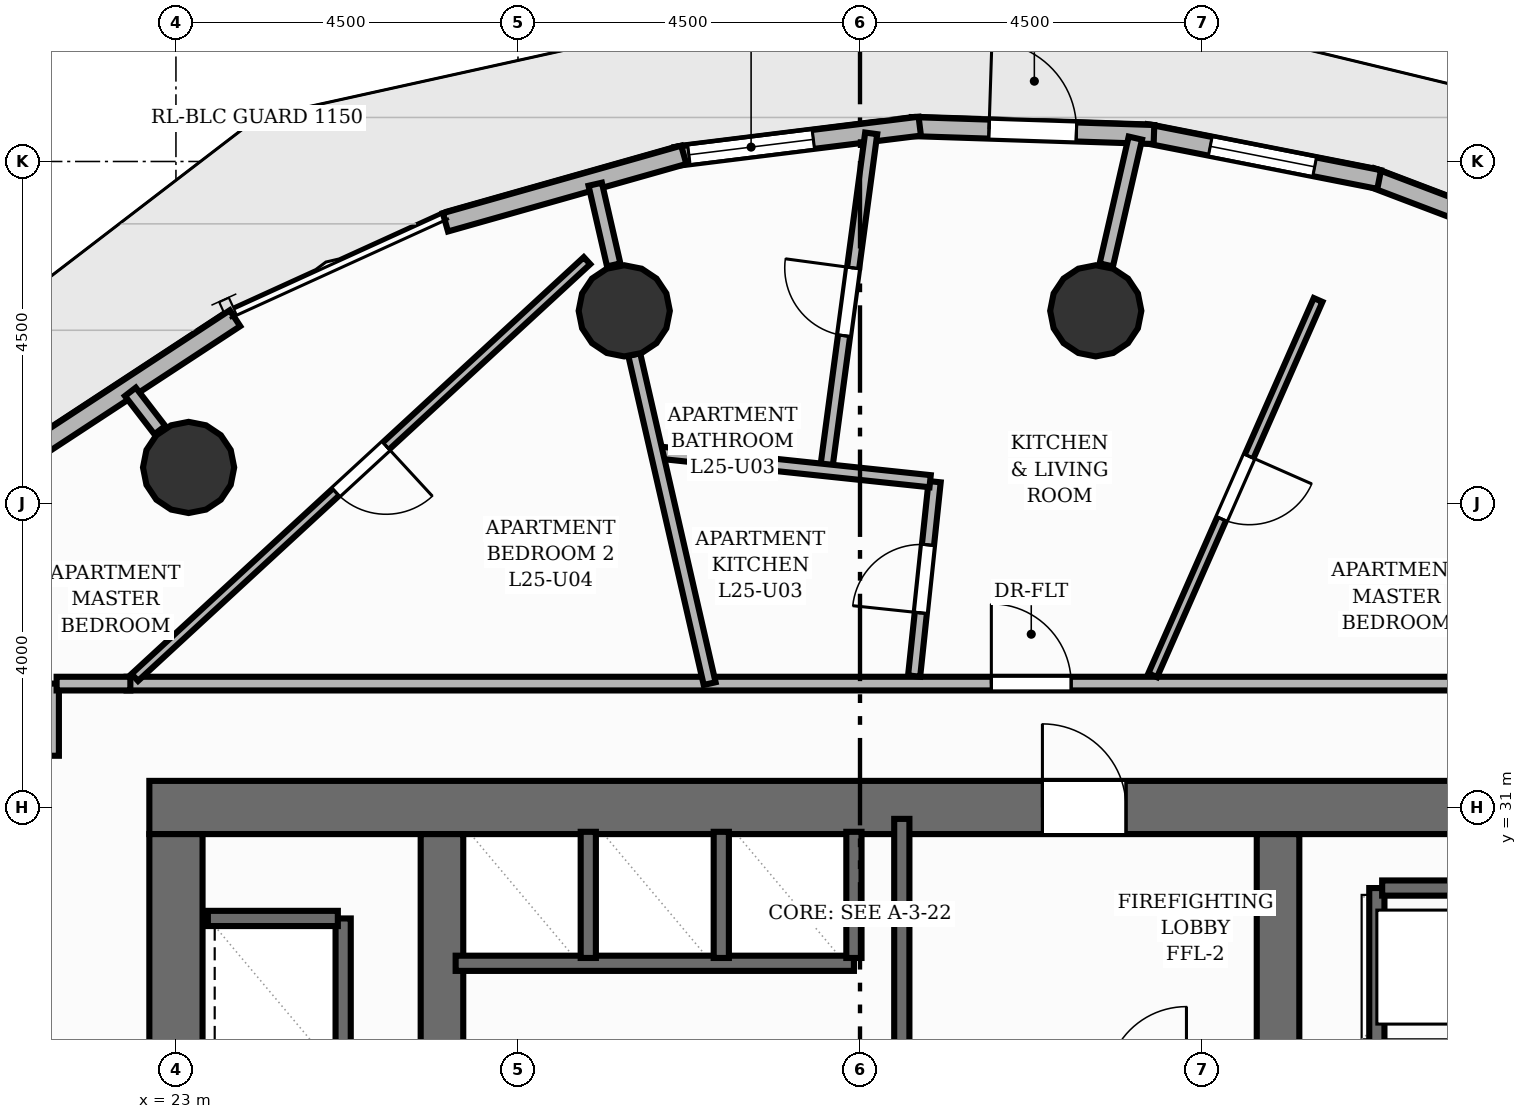
"""IFC4 building model, lengths in metres.
Left out: names, types, materials, properties, quantities, classifications, styles, units other than length and angle.
Written with IfcOpenShell. Run it as: python <this file> out.ifc"""

import sys

from ifc_helpers import new_model, si_unit, direction, frame, frame_2d, origin, origin_2d, place, context, subcontext, project, spatial, rectangle, circle, extrude, element, fill, save


model = new_model("IFC4")
c1 = context("Model", 3, precision=1e-05, world=origin(), true_north=direction((0.0, 1.0)))
c2 = subcontext(c1, "Body", "Model", "MODEL_VIEW")
j1 = project(units=[si_unit("LENGTHUNIT", "METRE"), si_unit("PLANEANGLEUNIT", "RADIAN")], contexts=[c1])
p1 = place(None, origin())
s1 = spatial("IfcSite", under=j1, at=p1, CompositionType="ELEMENT")
p2 = place(p1, origin())
s2 = spatial("IfcBuilding", under=s1, at=p2, CompositionType="ELEMENT")
p3 = place(p2, frame((0.0, 0.0, 86.88)))
s3 = spatial("IfcBuildingStorey", under=s2, at=p3, CompositionType="ELEMENT", Elevation=86.88)
p4 = place(p3, frame((22.65, 31.0, 0.0), z_axis=(0.0, 0.0, 1.0), x_axis=(1.0, 0.0, 0.0)))
e1 = element("IfcWall", 1, at=p4, inside=s3, PredefinedType="SHEAR", context=c2, shape_type="SweptSolid", body=[
    extrude(rectangle(XDim=18.7, YDim=0.7, at=frame_2d((9.35, 0.0))), origin(), (0.0, 0.0, 1.0), 3.2),
])
p5 = place(p4, frame((11.75, 0.0, 0.0)))
e2 = element("IfcOpeningElement", 2, at=p5, cuts=e1, PredefinedType="OPENING", context=c2, shape_type="SweptSolid", body=[
    extrude(rectangle(XDim=1.1, YDim=2.15, at=frame_2d((0.55, 1.075))), frame((0.0, 0.36, 0.0), z_axis=(0.0, -1.0, 0.0), x_axis=(1.0, 0.0, 0.0)), (0.0, 0.0, 1.0), 0.72),
])
p6 = place(p3, frame((23.0, 17.35, 0.0), z_axis=(0.0, 0.0, 1.0), x_axis=(0.0, 1.0, 0.0)))
e3 = element("IfcWall", 3, at=p6, inside=s3, PredefinedType="SHEAR", context=c2, shape_type="SweptSolid", body=[
    extrude(rectangle(XDim=13.3, YDim=0.7, at=frame_2d((6.65, 0.0))), origin(), (0.0, 0.0, 1.0), 3.2),
])
for number, where, z_axis, x_axis in (
    (4, (26.5, 17.35, 0.0), (0.0, 0.0, 1.0), (0.0, 1.0, 0.0)),
    (5, (37.5, 17.35, 0.0), (0.0, 0.0, 1.0), (0.0, 1.0, 0.0)),
):
    element("IfcWall", number, at=place(p3, frame(where, z_axis=z_axis, x_axis=x_axis)), inside=s3, PredefinedType="SHEAR", context=c2, shape_type="SweptSolid", body=[
        extrude(rectangle(XDim=13.3, YDim=0.56, at=frame_2d((6.65, 0.0))), origin(), (0.0, 0.0, 1.0), 3.2),
    ])
for number, where, z_axis, x_axis in (
    (6, (35.102, 37.535, 0.0), (0.0, 0.0, 1.0), (1.0, 0.0, 0.0)),
    (7, (28.898, 37.535, 0.0), (0.0, 0.0, 1.0), (1.0, 0.0, 0.0)),
    (8, (23.167, 35.474, 0.0), (0.0, 0.0, 1.0), (1.0, 0.0, 0.0)),
):
    element("IfcColumn", number, at=place(p3, frame(where, z_axis=z_axis, x_axis=x_axis)), inside=s3, PredefinedType="COLUMN", context=c2, shape_type="SweptSolid", body=[
        extrude(circle(Radius=0.6, at=origin_2d()), origin(), (0.0, 0.0, 1.0), 3.2),
    ])
p7 = place(p3, frame((38.724, 39.293, 0.0), z_axis=(0.0, 0.0, 1.0), x_axis=(0.934815891493, -0.355132720277, 0.0)))
e9 = element("IfcWall", 9, at=p7, inside=s3, PredefinedType="SOLIDWALL", context=c2, shape_type="SweptSolid", body=[
    extrude(rectangle(XDim=3.061, YDim=0.25, at=frame_2d((1.53, 0.0))), origin(), (0.0, 0.0, 1.0), 2.96),
])
p8 = place(p3, frame((35.758, 39.867, 0.0), z_axis=(0.0, 0.0, 1.0), x_axis=(0.981187677549, -0.193056316721, 0.0)))
e10 = element("IfcWall", 10, at=p8, inside=s3, PredefinedType="SOLIDWALL", context=c2, shape_type="SweptSolid", body=[
    extrude(rectangle(XDim=3.131, YDim=0.25, at=frame_2d((1.565, 0.0))), origin(), (0.0, 0.0, 1.0), 2.96),
])
p9 = place(p8, frame((0.866, 0.0, 0.85)))
e11 = element("IfcOpeningElement", 11, at=p9, cuts=e10, PredefinedType="OPENING", context=c2, shape_type="SweptSolid", body=[
    extrude(rectangle(XDim=1.4, YDim=1.55, at=frame_2d((0.7, 0.775))), frame((0.0, 0.135, 0.0), z_axis=(0.0, -1.0, 0.0), x_axis=(1.0, 0.0, 0.0)), (0.0, 0.0, 1.0), 0.27),
])
p10 = place(p3, frame((32.677, 39.959, 0.0), z_axis=(0.0, 0.0, 1.0), x_axis=(0.999464092211, -0.032734208101, 0.0)))
e12 = element("IfcWall", 12, at=p10, inside=s3, PredefinedType="SOLIDWALL", context=c2, shape_type="SweptSolid", body=[
    extrude(rectangle(XDim=3.192, YDim=0.25, at=frame_2d((1.596, 0.0))), origin(), (0.0, 0.0, 1.0), 2.96),
])
p11 = place(p10, frame((1.021, 0.0, 0.0)))
e13 = element("IfcOpeningElement", 13, at=p11, cuts=e12, PredefinedType="OPENING", context=c2, shape_type="SweptSolid", body=[
    extrude(rectangle(XDim=1.15, YDim=2.2, at=frame_2d((0.575, 1.1))), frame((0.0, 0.135, 0.0), z_axis=(0.0, -1.0, 0.0), x_axis=(1.0, 0.0, 0.0)), (0.0, 0.0, 1.0), 0.27),
])
p12 = place(p3, frame((29.575, 39.566, 0.0), z_axis=(0.0, 0.0, 1.0), x_axis=(0.99241077266, 0.122966899235, 0.0)))
e14 = element("IfcWall", 14, at=p12, inside=s3, PredefinedType="SOLIDWALL", context=c2, shape_type="SweptSolid", body=[
    extrude(rectangle(XDim=3.236, YDim=0.25, at=frame_2d((1.618, 0.0))), origin(), (0.0, 0.0, 1.0), 2.96),
])
p13 = place(p12, frame((0.175, 0.0, 0.85)))
e15 = element("IfcOpeningElement", 15, at=p13, cuts=e14, PredefinedType="OPENING", context=c2, shape_type="SweptSolid", body=[
    extrude(rectangle(XDim=1.65, YDim=1.55, at=frame_2d((0.825, 0.775))), frame((0.0, 0.135, 0.0), z_axis=(0.0, -1.0, 0.0), x_axis=(1.0, 0.0, 0.0)), (0.0, 0.0, 1.0), 0.27),
])
p14 = place(p3, frame((26.545, 38.699, 0.0), z_axis=(0.0, 0.0, 1.0), x_axis=(0.962134911526, 0.272573681825, 0.0)))
e16 = element("IfcWall", 16, at=p14, inside=s3, PredefinedType="SOLIDWALL", context=c2, shape_type="SweptSolid", body=[
    extrude(rectangle(XDim=3.26, YDim=0.25, at=frame_2d((1.63, 0.0))), origin(), (0.0, 0.0, 1.0), 2.96),
])
p15 = place(p3, frame((21.071, 35.663, 0.0), z_axis=(0.0, 0.0, 1.0), x_axis=(0.836273856728, 0.548311988336, 0.0)))
e17 = element("IfcWall", 17, at=p15, inside=s3, PredefinedType="SOLIDWALL", context=c2, shape_type="SweptSolid", body=[
    extrude(rectangle(XDim=3.236, YDim=0.25, at=frame_2d((1.618, 0.0))), origin(), (0.0, 0.0, 1.0), 2.96),
])
p16 = place(p3, frame((32.55, 27.35, 0.0), z_axis=(0.0, 0.0, 1.0), x_axis=(0.0, 1.0, 0.0)))
e18 = element("IfcWall", 18, at=p16, inside=s3, PredefinedType="SHEAR", context=c2, shape_type="SweptSolid", body=[
    extrude(rectangle(XDim=3.5, YDim=0.2, at=frame_2d((1.75, 0.0))), origin(), (0.0, 0.0, 1.0), 3.2),
])
p17 = place(p3, frame((38.8, 18.06, 0.0), z_axis=(0.0, 0.0, 1.0), x_axis=(0.0, 1.0, 0.0)))
e19 = element("IfcWall", 19, at=p17, inside=s3, PredefinedType="SHEAR", context=c2, shape_type="SweptSolid", body=[
    extrude(rectangle(XDim=11.88, YDim=0.2, at=frame_2d((5.94, 0.0))), origin(), (0.0, 0.0, 1.0), 3.2),
])
p18 = place(p3, frame((38.87, 29.94, 0.0), z_axis=(0.0, 0.0, 1.0), x_axis=(1.0, 0.0, 0.0)))
e20 = element("IfcWall", 20, at=p18, inside=s3, PredefinedType="SHEAR", context=c2, shape_type="SweptSolid", body=[
    extrude(rectangle(XDim=1.71, YDim=0.2, at=frame_2d((0.855, 0.0))), origin(), (0.0, 0.0, 1.0), 3.2),
])
p19 = place(p3, frame((25.2, 18.46, 0.0), z_axis=(0.0, 0.0, 1.0), x_axis=(0.0, 1.0, 0.0)))
e21 = element("IfcWall", 21, at=p19, inside=s3, PredefinedType="SHEAR", context=c2, shape_type="SweptSolid", body=[
    extrude(rectangle(XDim=11.08, YDim=0.2, at=frame_2d((5.54, 0.0))), origin(), (0.0, 0.0, 1.0), 3.2),
])
p20 = place(p3, frame((23.42, 29.54, 0.0), z_axis=(0.0, 0.0, 1.0), x_axis=(1.0, 0.0, 0.0)))
e22 = element("IfcWall", 22, at=p20, inside=s3, PredefinedType="SHEAR", context=c2, shape_type="SweptSolid", body=[
    extrude(rectangle(XDim=1.71, YDim=0.2, at=frame_2d((0.855, 0.0))), origin(), (0.0, 0.0, 1.0), 3.2),
])
p21 = place(p3, frame((26.68, 28.95, 0.0), z_axis=(0.0, 0.0, 1.0), x_axis=(1.0, 0.0, 0.0)))
e23 = element("IfcWall", 23, at=p21, inside=s3, PredefinedType="SHEAR", context=c2, shape_type="SweptSolid", body=[
    extrude(rectangle(XDim=5.24, YDim=0.2, at=frame_2d((2.62, 0.0))), origin(), (0.0, 0.0, 1.0), 3.2),
])
for number, where, z_axis, x_axis in (
    (24, (31.92, 29.02, 0.0), (0.0, 0.0, 1.0), (0.0, 1.0, 0.0)),
    (25, (28.425, 29.02, 0.0), (0.0, 0.0, 1.0), (0.0, 1.0, 0.0)),
    (26, (30.175, 29.02, 0.0), (0.0, 0.0, 1.0), (0.0, 1.0, 0.0)),
):
    element("IfcWall", number, at=place(p3, frame(where, z_axis=z_axis, x_axis=x_axis)), inside=s3, PredefinedType="SHEAR", context=c2, shape_type="SweptSolid", body=[
        extrude(rectangle(XDim=1.66, YDim=0.2, at=frame_2d((0.83, 0.0))), origin(), (0.0, 0.0, 1.0), 3.2),
    ])
p22 = place(p3, frame((35.24, 38.139, 0.0), z_axis=(0.0, 0.0, 1.0), x_axis=(0.223359217097, 0.974736200281, 0.0)))
e27 = element("IfcWall", 27, at=p22, inside=s3, PredefinedType="PARTITIONING", context=c2, shape_type="SweptSolid", body=[
    extrude(rectangle(XDim=1.712, YDim=0.18, at=frame_2d((0.856, 0.0))), origin(), (0.0, 0.0, 1.0), 2.261),
])
p23 = place(p3, frame((28.76, 38.139, 0.0), z_axis=(0.0, 0.0, 1.0), x_axis=(-0.223287406217, 0.974752652843, 0.0)))
e28 = element("IfcWall", 28, at=p23, inside=s3, PredefinedType="PARTITIONING", context=c2, shape_type="SweptSolid", body=[
    extrude(rectangle(XDim=1.089, YDim=0.18, at=frame_2d((0.544, 0.0))), origin(), (0.0, 0.0, 1.0), 2.261),
])
p24 = place(p3, frame((22.788, 35.966, 0.0), z_axis=(0.0, 0.0, 1.0), x_axis=(-0.609970610867, 0.792424036661, 0.0)))
e29 = element("IfcWall", 29, at=p24, inside=s3, PredefinedType="PARTITIONING", context=c2, shape_type="SweptSolid", body=[
    extrude(rectangle(XDim=0.635, YDim=0.18, at=frame_2d((0.318, 0.0))), origin(), (0.0, 0.0, 1.0), 2.261),
])
p25 = place(p3, frame((22.351, 32.63, 0.0), z_axis=(0.0, 0.0, 1.0), x_axis=(1.0, 0.0, 0.0)))
e30 = element("IfcWall", 30, at=p25, inside=s3, PredefinedType="PARTITIONING", context=c2, shape_type="SweptSolid", body=[
    extrude(rectangle(XDim=20.279, YDim=0.18, at=frame_2d((10.14, 0.0))), origin(), (0.0, 0.0, 1.0), 2.955),
])
p26 = place(p25, frame((11.378, 0.0, 0.0)))
e31 = element("IfcOpeningElement", 31, at=p26, cuts=e30, PredefinedType="OPENING", context=c2, shape_type="SweptSolid", body=[
    extrude(rectangle(XDim=1.05, YDim=2.15, at=frame_2d((0.525, 1.075))), frame((0.0, 0.1, 0.0), z_axis=(0.0, -1.0, 0.0), x_axis=(1.0, 0.0, 0.0)), (0.0, 0.0, 1.0), 0.2),
])
p27 = place(p3, frame((21.37, 31.681, 0.0), z_axis=(0.0, 0.0, 1.0), x_axis=(0.0, 1.0, 0.0)))
e32 = element("IfcWall", 32, at=p27, inside=s3, PredefinedType="PARTITIONING", context=c2, shape_type="SweptSolid", body=[
    extrude(rectangle(XDim=0.949, YDim=0.18, at=frame_2d((0.475, 0.0))), origin(), (0.0, 0.0, 1.0), 2.955),
])
p28 = place(p3, frame((21.43, 32.63, 0.0), z_axis=(0.0, 0.0, 1.0), x_axis=(1.0, 0.0, 0.0)))
e33 = element("IfcWall", 33, at=p28, inside=s3, PredefinedType="PARTITIONING", context=c2, shape_type="SweptSolid", body=[
    extrude(rectangle(XDim=0.97, YDim=0.18, at=frame_2d((0.485, 0.0))), origin(), (0.0, 0.0, 1.0), 2.955),
])
p29 = place(p3, frame((31.552, 35.438, 0.0), z_axis=(0.0, 0.0, 1.0), x_axis=(0.132986130607, 0.991117898671, 0.0)))
e34 = element("IfcWall", 34, at=p29, inside=s3, PredefinedType="PLUMBINGWALL", context=c2, shape_type="SweptSolid", body=[
    extrude(rectangle(XDim=4.472, YDim=0.16, at=frame_2d((2.236, 0.0))), origin(), (0.0, 0.0, 1.0), 2.955),
])
p30 = place(p29, frame((1.786, 0.0, 0.0)))
e35 = element("IfcOpeningElement", 35, at=p30, cuts=e34, PredefinedType="OPENING", context=c2, shape_type="SweptSolid", body=[
    extrude(rectangle(XDim=0.9, YDim=2.1, at=frame_2d((0.45, 1.05))), frame((0.0, 0.09, 0.0), z_axis=(0.0, -1.0, 0.0), x_axis=(1.0, 0.0, 0.0)), (0.0, 0.0, 1.0), 0.18),
])
p31 = place(p3, frame((38.027, 37.678, 0.0), z_axis=(0.0, 0.0, 1.0), x_axis=(-0.403235845427, -0.91509608947, 0.0)))
e36 = element("IfcWall", 36, at=p31, inside=s3, PredefinedType="PARTITIONING", context=c2, shape_type="SweptSolid", body=[
    extrude(rectangle(XDim=5.396, YDim=0.125, at=frame_2d((2.698, 0.0))), origin(), (0.0, 0.0, 1.0), 2.955),
])
p32 = place(p31, frame((2.248, 0.0, 0.0)))
e37 = element("IfcOpeningElement", 37, at=p32, cuts=e36, PredefinedType="OPENING", context=c2, shape_type="SweptSolid", body=[
    extrude(rectangle(XDim=0.9, YDim=2.1, at=frame_2d((0.45, 1.05))), frame((0.0, 0.073, 0.0), z_axis=(0.0, -1.0, 0.0), x_axis=(1.0, 0.0, 0.0)), (0.0, 0.0, 1.0), 0.145),
])
p33 = place(p3, frame((32.712, 32.729, 0.0), z_axis=(0.0, 0.0, 1.0), x_axis=(0.105094954285, 0.994462191631, 0.0)))
e38 = element("IfcWall", 38, at=p33, inside=s3, PredefinedType="PLUMBINGWALL", context=c2, shape_type="SweptSolid", body=[
    extrude(rectangle(XDim=2.572, YDim=0.16, at=frame_2d((1.286, 0.0))), origin(), (0.0, 0.0, 1.0), 2.642),
])
p34 = place(p33, frame((0.836, 0.0, 0.0)))
e39 = element("IfcOpeningElement", 39, at=p34, cuts=e38, PredefinedType="OPENING", context=c2, shape_type="SweptSolid", body=[
    extrude(rectangle(XDim=0.9, YDim=2.1, at=frame_2d((0.45, 1.05))), frame((0.0, 0.09, 0.0), z_axis=(0.0, -1.0, 0.0), x_axis=(1.0, 0.0, 0.0)), (0.0, 0.0, 1.0), 0.18),
])
p35 = place(p3, frame((32.923, 35.293, 0.0), z_axis=(0.0, 0.0, 1.0), x_axis=(-0.994472124215, 0.105000924563, 0.0)))
e40 = element("IfcWall", 40, at=p35, inside=s3, PredefinedType="PLUMBINGWALL", context=c2, shape_type="SweptSolid", body=[
    extrude(rectangle(XDim=3.618, YDim=0.16, at=frame_2d((1.809, 0.0))), origin(), (0.0, 0.0, 1.0), 2.955),
])
p36 = place(p3, frame((30.022, 32.63, 0.0), z_axis=(0.0, 0.0, 1.0), x_axis=(-0.223321757884, 0.974744783241, 0.0)))
e41 = element("IfcWall", 41, at=p36, inside=s3, PredefinedType="PLUMBINGWALL", context=c2, shape_type="SweptSolid", body=[
    extrude(rectangle(XDim=4.442, YDim=0.16, at=frame_2d((2.221, 0.0))), origin(), (0.0, 0.0, 1.0), 2.261),
])
p37 = place(p3, frame((28.408, 38.195, 0.0), z_axis=(0.0, 0.0, 1.0), x_axis=(-0.735306461181, -0.677734762386, 0.0)))
e42 = element("IfcWall", 42, at=p37, inside=s3, PredefinedType="PARTITIONING", context=c2, shape_type="SweptSolid", body=[
    extrude(rectangle(XDim=8.091, YDim=0.125, at=frame_2d((4.045, 0.0))), origin(), (0.0, 0.0, 1.0), 2.404),
])
p38 = place(p37, frame((3.596, 0.0, 0.0)))
e43 = element("IfcOpeningElement", 43, at=p38, cuts=e42, PredefinedType="OPENING", context=c2, shape_type="SweptSolid", body=[
    extrude(rectangle(XDim=0.9, YDim=2.1, at=frame_2d((0.45, 1.05))), frame((0.0, 0.073, 0.0), z_axis=(0.0, -1.0, 0.0), x_axis=(1.0, 0.0, 0.0)), (0.0, 0.0, 1.0), 0.145),
])
p39 = place(p11, origin())
e44 = element("IfcDoor", 44, at=p39, inside=s3, OperationType="SINGLE_SWING_LEFT", PredefinedType="DOOR", context=c2, shape_type="SweptSolid", body=[
    extrude(rectangle(XDim=1.15, YDim=2.2, at=frame_2d((0.575, 1.1))), frame((0.0, 0.025, 0.0), z_axis=(0.0, -1.0, 0.0), x_axis=(1.0, 0.0, 0.0)), (0.0, 0.0, 1.0), 0.05),
])
fill(e13, e44)
p40 = place(p9, origin())
e45 = element("IfcWindow", 45, at=p40, inside=s3, PartitioningType="SINGLE_PANEL", PredefinedType="WINDOW", context=c2, shape_type="SweptSolid", body=[
    extrude(rectangle(XDim=1.4, YDim=1.55, at=frame_2d((0.7, 0.775))), frame((0.0, 0.03, 0.0), z_axis=(0.0, -1.0, 0.0), x_axis=(1.0, 0.0, 0.0)), (0.0, 0.0, 1.0), 0.06),
])
fill(e11, e45)
p41 = place(p13, origin())
e46 = element("IfcWindow", 46, at=p41, inside=s3, PartitioningType="SINGLE_PANEL", PredefinedType="WINDOW", context=c2, shape_type="SweptSolid", body=[
    extrude(rectangle(XDim=1.65, YDim=1.55, at=frame_2d((0.825, 0.775))), frame((0.0, 0.03, 0.0), z_axis=(0.0, -1.0, 0.0), x_axis=(1.0, 0.0, 0.0)), (0.0, 0.0, 1.0), 0.06),
])
fill(e15, e46)
p42 = place(p5, origin())
e47 = element("IfcDoor", 47, at=p42, inside=s3, OperationType="SINGLE_SWING_LEFT", PredefinedType="DOOR", context=c2, shape_type="SweptSolid", body=[
    extrude(rectangle(XDim=1.1, YDim=2.15, at=frame_2d((0.55, 1.075))), frame((0.0, 0.025, 0.0), z_axis=(0.0, -1.0, 0.0), x_axis=(1.0, 0.0, 0.0)), (0.0, 0.0, 1.0), 0.05),
])
fill(e2, e47)
p43 = place(p26, origin())
e48 = element("IfcDoor", 48, at=p43, inside=s3, OperationType="SINGLE_SWING_LEFT", PredefinedType="DOOR", context=c2, shape_type="SweptSolid", body=[
    extrude(rectangle(XDim=1.05, YDim=2.15, at=frame_2d((0.525, 1.075))), frame((0.0, 0.025, 0.0), z_axis=(0.0, -1.0, 0.0), x_axis=(1.0, 0.0, 0.0)), (0.0, 0.0, 1.0), 0.05),
])
fill(e31, e48)
p44 = place(p30, origin())
e49 = element("IfcDoor", 49, at=p44, inside=s3, OperationType="SINGLE_SWING_RIGHT", PredefinedType="DOOR", context=c2, shape_type="SweptSolid", body=[
    extrude(rectangle(XDim=0.9, YDim=2.1, at=frame_2d((0.45, 1.05))), frame((0.0, 0.025, 0.0), z_axis=(0.0, -1.0, 0.0), x_axis=(1.0, 0.0, 0.0)), (0.0, 0.0, 1.0), 0.05),
])
fill(e35, e49)
p45 = place(p32, origin())
e50 = element("IfcDoor", 50, at=p45, inside=s3, OperationType="SINGLE_SWING_LEFT", PredefinedType="DOOR", context=c2, shape_type="SweptSolid", body=[
    extrude(rectangle(XDim=0.9, YDim=2.1, at=frame_2d((0.45, 1.05))), frame((0.0, 0.025, 0.0), z_axis=(0.0, -1.0, 0.0), x_axis=(1.0, 0.0, 0.0)), (0.0, 0.0, 1.0), 0.05),
])
fill(e37, e50)
p46 = place(p34, origin())
e51 = element("IfcDoor", 51, at=p46, inside=s3, OperationType="SINGLE_SWING_LEFT", PredefinedType="DOOR", context=c2, shape_type="SweptSolid", body=[
    extrude(rectangle(XDim=0.9, YDim=2.1, at=frame_2d((0.45, 1.05))), frame((0.0, 0.025, 0.0), z_axis=(0.0, -1.0, 0.0), x_axis=(1.0, 0.0, 0.0)), (0.0, 0.0, 1.0), 0.05),
])
fill(e39, e51)
p47 = place(p38, origin())
e52 = element("IfcDoor", 52, at=p47, inside=s3, OperationType="SINGLE_SWING_LEFT", PredefinedType="DOOR", context=c2, shape_type="SweptSolid", body=[
    extrude(rectangle(XDim=0.9, YDim=2.1, at=frame_2d((0.45, 1.05))), frame((0.0, 0.025, 0.0), z_axis=(0.0, -1.0, 0.0), x_axis=(1.0, 0.0, 0.0)), (0.0, 0.0, 1.0), 0.05),
])
fill(e43, e52)
save(model, sys.argv[1])
